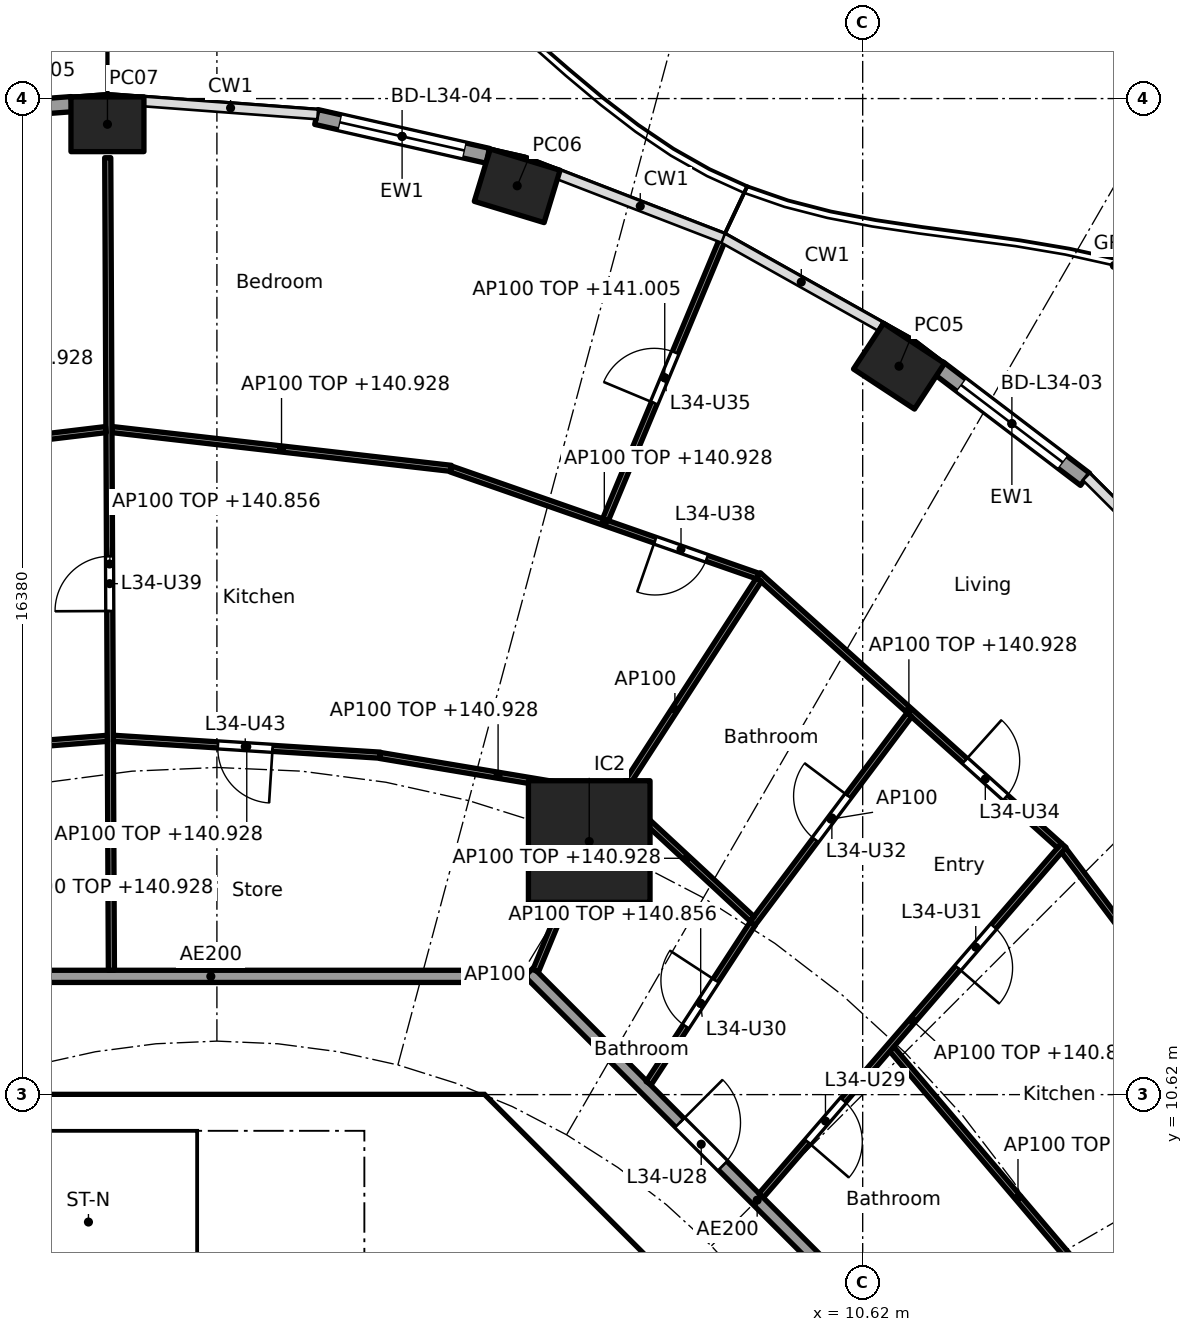
"""IFC4 building model, lengths in metres.
Left out: names, types, materials, properties, quantities, classifications, styles, units other than length and angle.
Written with IfcOpenShell. Run it as: python <this file> out.ifc"""

import sys

from ifc_helpers import new_model, si_unit, direction, frame, frame_2d, origin, origin_2d, place, context, subcontext, project, spatial, polyline, rectangle, hollow_rectangle, outline, extrude, element, fill, save


model = new_model("IFC4")
c1 = context("Model", 3, precision=1e-05, world=origin(), true_north=direction((0.0, 1.0)))
c2 = subcontext(c1, "Body", "Model", "MODEL_VIEW")
j1 = project(units=[si_unit("LENGTHUNIT", "METRE"), si_unit("PLANEANGLEUNIT", "RADIAN")], contexts=[c1])
p1 = place(None, origin())
s1 = spatial("IfcSite", under=j1, at=p1, CompositionType="ELEMENT")
p2 = place(p1, origin())
s2 = spatial("IfcBuilding", under=s1, at=p2, CompositionType="ELEMENT")
p3 = place(p2, frame((0.0, 0.0, 138.1)))
s3 = spatial("IfcBuildingStorey", under=s2, at=p3, CompositionType="ELEMENT", Elevation=138.1)
for number, where, z_axis, x_axis in (
    (1, (11.218, 22.599, 0.0), (0.0, 0.0, 1.0), (-0.836, 0.549, 0.0)),
    (2, (4.938, 25.565, 0.0), (0.0, 0.0, 1.0), (-0.957, 0.292, 0.0)),
    (3, (-1.8, 26.577, 0.0), (0.0, 0.0, 1.0), (-1.0, 0.0, 0.0)),
):
    element("IfcColumn", number, at=place(p3, frame(where, z_axis=z_axis, x_axis=x_axis)), inside=s3, PredefinedType="COLUMN", context=c2, shape_type="SweptSolid", body=[
        extrude(hollow_rectangle(XDim=1.2, YDim=0.9, WallThickness=0.04, at=origin_2d()), origin(), (0.0, 0.0, 1.0), 3.7),
    ])
p4 = place(p3, frame((6.123, 14.782, 0.0), z_axis=(0.0, 0.0, 1.0), x_axis=(1.0, 0.0, 0.0)))
e4 = element("IfcColumn", 4, at=p4, inside=s3, PredefinedType="COLUMN", context=c2, shape_type="SweptSolid", body=[
    extrude(rectangle(XDim=2.0, YDim=2.0, at=origin_2d()), origin(), (0.0, 0.0, 1.0), 3.7),
])
p5 = place(p3, frame((11.869, 22.569, 0.0), z_axis=(0.0, 0.0, 1.0), x_axis=(0.796022231079, -0.605267385233, 0.0)))
e5 = element("IfcWall", 5, at=p5, inside=s3, PredefinedType="SOLIDWALL", context=c2, shape_type="SweptSolid", body=[
    extrude(rectangle(XDim=3.026, YDim=0.25, at=frame_2d((1.513, 0.0))), origin(), (0.0, 0.0, 1.0), 3.44),
])
p6 = place(p5, frame((0.463, 0.0, 0.0)))
e6 = element("IfcOpeningElement", 6, at=p6, cuts=e5, PredefinedType="OPENING", context=c2, shape_type="SweptSolid", body=[
    extrude(rectangle(XDim=2.1, YDim=2.4, at=frame_2d((1.05, 1.2))), frame((0.0, 0.135, 0.0), z_axis=(0.0, -1.0, 0.0), x_axis=(1.0, 0.0, 0.0)), (0.0, 0.0, 1.0), 0.27),
])
p7 = place(p3, frame((1.636, 26.697, 0.0), z_axis=(0.0, 0.0, 1.0), x_axis=(0.975339035722, -0.220711951186, 0.0)))
e7 = element("IfcWall", 7, at=p7, inside=s3, PredefinedType="SOLIDWALL", context=c2, shape_type="SweptSolid", body=[
    extrude(rectangle(XDim=2.89, YDim=0.25, at=frame_2d((1.445, 0.0))), origin(), (0.0, 0.0, 1.0), 3.44),
])
p8 = place(p7, frame((0.395, 0.0, 0.0)))
e8 = element("IfcOpeningElement", 8, at=p8, cuts=e7, PredefinedType="OPENING", context=c2, shape_type="SweptSolid", body=[
    extrude(rectangle(XDim=2.1, YDim=2.4, at=frame_2d((1.05, 1.2))), frame((0.0, 0.135, 0.0), z_axis=(0.0, -1.0, 0.0), x_axis=(1.0, 0.0, 0.0)), (0.0, 0.0, 1.0), 0.27),
])
p9 = place(p3, frame((-5.254, 26.694, 0.0), z_axis=(0.0, 0.0, 1.0), x_axis=(0.997231697044, 0.074356858535, 0.0)))
e9 = element("IfcWall", 9, at=p9, inside=s3, PredefinedType="SOLIDWALL", context=c2, shape_type="SweptSolid", body=[
    extrude(rectangle(XDim=2.873, YDim=0.25, at=frame_2d((1.437, 0.0))), origin(), (0.0, 0.0, 1.0), 3.44),
])
p10 = place(p9, frame((0.386, 0.0, 0.0)))
e10 = element("IfcOpeningElement", 10, at=p10, cuts=e9, PredefinedType="OPENING", context=c2, shape_type="SweptSolid", body=[
    extrude(rectangle(XDim=2.1, YDim=2.4, at=frame_2d((1.05, 1.2))), frame((0.0, 0.135, 0.0), z_axis=(0.0, -1.0, 0.0), x_axis=(1.0, 0.0, 0.0)), (0.0, 0.0, 1.0), 0.27),
])
p11 = place(p3, frame((9.988, 4.613, 0.0), z_axis=(0.0, 0.0, 1.0), x_axis=(-0.707106781187, 0.707106781187, 0.0)))
e11 = element("IfcWall", 11, at=p11, inside=s3, PredefinedType="SHEAR", context=c2, shape_type="SweptSolid", body=[
    extrude(rectangle(XDim=7.602, YDim=0.6, at=frame_2d((3.801, 0.0))), origin(), (0.0, 0.0, 1.0), 3.44),
])
p12 = place(p11, frame((3.201, 0.0, 0.0)))
e12 = element("IfcOpeningElement", 12, at=p12, cuts=e11, PredefinedType="OPENING", context=c2, shape_type="SweptSolid", body=[
    extrude(rectangle(XDim=1.2, YDim=2.1, at=frame_2d((0.6, 1.05))), frame((0.0, 0.31, 0.0), z_axis=(0.0, -1.0, 0.0), x_axis=(1.0, 0.0, 0.0)), (0.0, 0.0, 1.0), 0.62),
])
p13 = place(p3, frame((4.0, 7.025, 0.0), z_axis=(0.0, 0.0, 1.0), x_axis=(0.0, 1.0, 0.0)))
e13 = element("IfcWall", 13, at=p13, inside=s3, PredefinedType="SOLIDWALL", context=c2, shape_type="SweptSolid", body=[
    extrude(rectangle(XDim=3.0, YDim=0.2, at=frame_2d((1.5, 0.0))), origin(), (0.0, 0.0, 1.0), 3.44),
])
p14 = place(p13, frame((0.925, 0.0, 0.0)))
e14 = element("IfcOpeningElement", 14, at=p14, cuts=e13, PredefinedType="OPENING", context=c2, shape_type="SweptSolid", body=[
    extrude(rectangle(XDim=1.1, YDim=2.1, at=frame_2d((0.55, 1.05))), frame((0.0, 0.11, 0.0), z_axis=(0.0, -1.0, 0.0), x_axis=(1.0, 0.0, 0.0)), (0.0, 0.0, 1.0), 0.22),
])
p15 = place(p3, origin())
e15 = element("IfcWall", 15, at=p15, inside=s3, PredefinedType="SHEAR", context=c2, shape_type="SweptSolid", body=[
    extrude(outline(polyline([(-4.152, 10.025), (-4.401, 9.776), (-4.825, 10.2), (-4.401, 10.625), (4.401, 10.625), (4.825, 10.2), (4.401, 9.776), (4.152, 10.025), (-4.152, 10.025)])), origin(), (0.0, 0.0, 1.0), 3.44),
])
p16 = place(p3, frame((12.635, 5.134, 0.0), z_axis=(0.0, 0.0, 1.0), x_axis=(-0.707106781187, 0.707106781187, 0.0)))
e16 = element("IfcWall", 16, at=p16, inside=s3, PredefinedType="PARTITIONING", context=c2, shape_type="SweptSolid", body=[
    extrude(rectangle(XDim=10.609, YDim=0.2, at=frame_2d((5.305, 0.0))), origin(), (0.0, 0.0, 1.0), 3.44),
])
p17 = place(p16, frame((6.106, 0.0, 0.0)))
e17 = element("IfcOpeningElement", 17, at=p17, cuts=e16, PredefinedType="OPENING", context=c2, shape_type="SweptSolid", body=[
    extrude(rectangle(XDim=1.0, YDim=2.1, at=frame_2d((0.5, 1.05))), frame((0.0, 0.11, 0.0), z_axis=(0.0, -1.0, 0.0), x_axis=(1.0, 0.0, 0.0)), (0.0, 0.0, 1.0), 0.22),
])
p18 = place(p3, frame((5.104, 12.565, 0.0), z_axis=(0.0, 0.0, 1.0), x_axis=(-1.0, 0.0, 0.0)))
e18 = element("IfcWall", 18, at=p18, inside=s3, PredefinedType="PARTITIONING", context=c2, shape_type="SweptSolid", body=[
    extrude(rectangle(XDim=10.409, YDim=0.2, at=frame_2d((5.205, 0.0))), origin(), (0.0, 0.0, 1.0), 3.44),
])
p19 = place(p3, frame((15.25, 6.483, 0.0), z_axis=(0.0, 0.0, 1.0), x_axis=(-0.647379829894, 0.762167537912, 0.0)))
e19 = element("IfcWall", 19, at=p19, inside=s3, PredefinedType="PARTITIONING", context=c2, shape_type="SweptSolid", body=[
    extrude(rectangle(XDim=6.413, YDim=0.1, at=frame_2d((3.206, 0.0))), origin(), (0.0, 0.0, 1.0), 2.828),
])
p20 = place(p3, frame((18.106, 9.098, 0.0), z_axis=(0.0, 0.0, 1.0), x_axis=(-0.602393803621, 0.798199038686, 0.0)))
e20 = element("IfcWall", 20, at=p20, inside=s3, PredefinedType="PARTITIONING", context=c2, shape_type="SweptSolid", body=[
    extrude(rectangle(XDim=6.944, YDim=0.1, at=frame_2d((3.472, 0.0))), origin(), (0.0, 0.0, 1.0), 2.828),
])
p21 = place(p3, frame((8.95, 8.96, 0.0), z_axis=(0.0, 0.0, 1.0), x_axis=(0.653829477183, 0.756641932995, 0.0)))
e21 = element("IfcWall", 21, at=p21, inside=s3, PredefinedType="PARTITIONING", context=c2, shape_type="SweptSolid", body=[
    extrude(rectangle(XDim=7.611, YDim=0.1, at=frame_2d((3.805, 0.0))), origin(), (0.0, 0.0, 1.0), 2.756),
])
p22 = place(p21, frame((1.168, 0.0, 0.0)))
e22 = element("IfcOpeningElement", 22, at=p22, cuts=e21, PredefinedType="OPENING", context=c2, shape_type="SweptSolid", body=[
    extrude(rectangle(XDim=0.9, YDim=2.1, at=frame_2d((0.45, 1.05))), frame((0.0, 0.06, 0.0), z_axis=(0.0, -1.0, 0.0), x_axis=(1.0, 0.0, 0.0)), (0.0, 0.0, 1.0), 0.12),
])
p23 = place(p21, frame((4.948, 0.0, 0.0)))
e23 = element("IfcOpeningElement", 23, at=p23, cuts=e21, PredefinedType="OPENING", context=c2, shape_type="SweptSolid", body=[
    extrude(rectangle(XDim=0.9, YDim=2.1, at=frame_2d((0.45, 1.05))), frame((0.0, 0.06, 0.0), z_axis=(0.0, -1.0, 0.0), x_axis=(1.0, 0.0, 0.0)), (0.0, 0.0, 1.0), 0.12),
])
p24 = place(p3, frame((13.856, 14.714, 0.0), z_axis=(0.0, 0.0, 1.0), x_axis=(-0.743793479211, 0.668409500444, 0.0)))
e24 = element("IfcWall", 24, at=p24, inside=s3, PredefinedType="PARTITIONING", context=c2, shape_type="SweptSolid", body=[
    extrude(rectangle(XDim=6.659, YDim=0.1, at=frame_2d((3.329, 0.0))), origin(), (0.0, 0.0, 1.0), 2.828),
])
p25 = place(p24, frame((1.19, 0.0, 0.0)))
e25 = element("IfcOpeningElement", 25, at=p25, cuts=e24, PredefinedType="OPENING", context=c2, shape_type="SweptSolid", body=[
    extrude(rectangle(XDim=0.9, YDim=2.1, at=frame_2d((0.45, 1.05))), frame((0.0, 0.06, 0.0), z_axis=(0.0, -1.0, 0.0), x_axis=(1.0, 0.0, 0.0)), (0.0, 0.0, 1.0), 0.12),
])
p26 = place(p3, frame((7.099, 10.808, 0.0), z_axis=(0.0, 0.0, 1.0), x_axis=(0.546709757921, 0.837322184463, 0.0)))
e26 = element("IfcWall", 26, at=p26, inside=s3, PredefinedType="PARTITIONING", context=c2, shape_type="SweptSolid", body=[
    extrude(rectangle(XDim=3.134, YDim=0.1, at=frame_2d((1.567, 0.0))), origin(), (0.0, 0.0, 1.0), 2.756),
])
p27 = place(p26, frame((1.117, 0.0, 0.0)))
e27 = element("IfcOpeningElement", 27, at=p27, cuts=e26, PredefinedType="OPENING", context=c2, shape_type="SweptSolid", body=[
    extrude(rectangle(XDim=0.9, YDim=2.1, at=frame_2d((0.45, 1.05))), frame((0.0, 0.06, 0.0), z_axis=(0.0, -1.0, 0.0), x_axis=(1.0, 0.0, 0.0)), (0.0, 0.0, 1.0), 0.12),
])
p28 = place(p3, frame((8.81, 13.434, 0.0), z_axis=(0.0, 0.0, 1.0), x_axis=(0.600491337497, 0.799631261014, 0.0)))
e28 = element("IfcWall", 28, at=p28, inside=s3, PredefinedType="PARTITIONING", context=c2, shape_type="SweptSolid", body=[
    extrude(rectangle(XDim=4.292, YDim=0.1, at=frame_2d((2.146, 0.0))), origin(), (0.0, 0.0, 1.0), 3.44),
])
p29 = place(p28, frame((1.721, 0.0, 0.0)))
e29 = element("IfcOpeningElement", 29, at=p29, cuts=e28, PredefinedType="OPENING", context=c2, shape_type="SweptSolid", body=[
    extrude(rectangle(XDim=0.9, YDim=2.1, at=frame_2d((0.45, 1.05))), frame((0.0, 0.06, 0.0), z_axis=(0.0, -1.0, 0.0), x_axis=(1.0, 0.0, 0.0)), (0.0, 0.0, 1.0), 0.12),
])
p30 = place(p3, frame((8.803, 13.508, 0.0), z_axis=(0.0, 0.0, 1.0), x_axis=(-0.733130973758, 0.680087476224, 0.0)))
e30 = element("IfcWall", 30, at=p30, inside=s3, PredefinedType="PARTITIONING", context=c2, shape_type="SweptSolid", body=[
    extrude(rectangle(XDim=2.937, YDim=0.1, at=frame_2d((1.468, 0.0))), origin(), (0.0, 0.0, 1.0), 2.828),
])
p31 = place(p3, frame((5.243, 12.657, 0.0), z_axis=(0.0, 0.0, 1.0), x_axis=(0.382703272338, 0.923871314276, 0.0)))
e31 = element("IfcWall", 31, at=p31, inside=s3, PredefinedType="PARTITIONING", context=c2, shape_type="SweptSolid", body=[
    extrude(rectangle(XDim=2.249, YDim=0.1, at=frame_2d((1.125, 0.0))), origin(), (0.0, 0.0, 1.0), 3.44),
])
p32 = place(p3, frame((6.15, 14.824, 0.0), z_axis=(0.0, 0.0, 1.0), x_axis=(0.543711280797, 0.839272329542, 0.0)))
e32 = element("IfcWall", 32, at=p32, inside=s3, PredefinedType="PARTITIONING", context=c2, shape_type="SweptSolid", body=[
    extrude(rectangle(XDim=5.083, YDim=0.1, at=frame_2d((2.541, 0.0))), origin(), (0.0, 0.0, 1.0), 3.44),
])
p33 = place(p3, frame((6.564, 15.547, 0.0), z_axis=(0.0, 0.0, 1.0), x_axis=(-0.986269521186, 0.165143669511, 0.0)))
e33 = element("IfcWall", 33, at=p33, inside=s3, PredefinedType="PARTITIONING", context=c2, shape_type="SweptSolid", body=[
    extrude(rectangle(XDim=3.934, YDim=0.1, at=frame_2d((1.967, 0.0))), origin(), (0.0, 0.0, 1.0), 2.828),
])
p34 = place(p3, frame((8.894, 19.148, 0.0), z_axis=(0.0, 0.0, 1.0), x_axis=(-0.944182005381, 0.329424256414, 0.0)))
e34 = element("IfcWall", 34, at=p34, inside=s3, PredefinedType="PARTITIONING", context=c2, shape_type="SweptSolid", body=[
    extrude(rectangle(XDim=5.344, YDim=0.1, at=frame_2d((2.672, 0.0))), origin(), (0.0, 0.0, 1.0), 2.828),
])
p35 = place(p34, frame((0.886, 0.0, 0.0)))
e35 = element("IfcOpeningElement", 35, at=p35, cuts=e34, PredefinedType="OPENING", context=c2, shape_type="SweptSolid", body=[
    extrude(rectangle(XDim=0.9, YDim=2.1, at=frame_2d((0.45, 1.05))), frame((0.0, 0.06, 0.0), z_axis=(0.0, -1.0, 0.0), x_axis=(1.0, 0.0, 0.0)), (0.0, 0.0, 1.0), 0.12),
])
p36 = place(p3, frame((6.39, 20.074, 0.0), z_axis=(0.0, 0.0, 1.0), x_axis=(0.385304133029, 0.922789642915, 0.0)))
e36 = element("IfcWall", 36, at=p36, inside=s3, PredefinedType="PARTITIONING", context=c2, shape_type="SweptSolid", body=[
    extrude(rectangle(XDim=5.058, YDim=0.1, at=frame_2d((2.529, 0.0))), origin(), (0.0, 0.0, 1.0), 2.905),
])
p37 = place(p36, frame((2.079, 0.0, 0.0)))
e37 = element("IfcOpeningElement", 37, at=p37, cuts=e36, PredefinedType="OPENING", context=c2, shape_type="SweptSolid", body=[
    extrude(rectangle(XDim=0.9, YDim=2.1, at=frame_2d((0.45, 1.05))), frame((0.0, 0.06, 0.0), z_axis=(0.0, -1.0, 0.0), x_axis=(1.0, 0.0, 0.0)), (0.0, 0.0, 1.0), 0.12),
])
p38 = place(p3, frame((2.685, 16.202, 0.0), z_axis=(0.0, 0.0, 1.0), x_axis=(-0.998000808042, 0.063201164138, 0.0)))
e38 = element("IfcWall", 38, at=p38, inside=s3, PredefinedType="PARTITIONING", context=c2, shape_type="SweptSolid", body=[
    extrude(rectangle(XDim=4.396, YDim=0.1, at=frame_2d((2.198, 0.0))), origin(), (0.0, 0.0, 1.0), 2.828),
])
p39 = place(p38, frame((1.773, 0.0, 0.0)))
e39 = element("IfcOpeningElement", 39, at=p39, cuts=e38, PredefinedType="OPENING", context=c2, shape_type="SweptSolid", body=[
    extrude(rectangle(XDim=0.9, YDim=2.1, at=frame_2d((0.45, 1.05))), frame((0.0, 0.06, 0.0), z_axis=(0.0, -1.0, 0.0), x_axis=(1.0, 0.0, 0.0)), (0.0, 0.0, 1.0), 0.12),
])
p40 = place(p3, frame((3.851, 20.919, 0.0), z_axis=(0.0, 0.0, 1.0), x_axis=(-0.993519908136, 0.11365822512, 0.0)))
e40 = element("IfcWall", 40, at=p40, inside=s3, PredefinedType="PARTITIONING", context=c2, shape_type="SweptSolid", body=[
    extrude(rectangle(XDim=5.613, YDim=0.1, at=frame_2d((2.806, 0.0))), origin(), (0.0, 0.0, 1.0), 2.828),
])
p41 = place(p3, frame((-1.735, 12.665, 0.0), z_axis=(0.0, 0.0, 1.0), x_axis=(-0.004494500855, 0.99998989968, 0.0)))
e41 = element("IfcWall", 41, at=p41, inside=s3, PredefinedType="PARTITIONING", context=c2, shape_type="SweptSolid", body=[
    extrude(rectangle(XDim=13.363, YDim=0.1, at=frame_2d((6.681, 0.0))), origin(), (0.0, 0.0, 1.0), 2.756),
])
p42 = place(p41, frame((5.908, 0.0, 0.0)))
e42 = element("IfcOpeningElement", 42, at=p42, cuts=e41, PredefinedType="OPENING", context=c2, shape_type="SweptSolid", body=[
    extrude(rectangle(XDim=0.9, YDim=2.1, at=frame_2d((0.45, 1.05))), frame((0.0, 0.06, 0.0), z_axis=(0.0, -1.0, 0.0), x_axis=(1.0, 0.0, 0.0)), (0.0, 0.0, 1.0), 0.12),
])
p43 = place(p3, frame((-1.802, 16.479, 0.0), z_axis=(0.0, 0.0, 1.0), x_axis=(-0.996907698294, -0.078581429625, 0.0)))
e43 = element("IfcWall", 43, at=p43, inside=s3, PredefinedType="PARTITIONING", context=c2, shape_type="SweptSolid", body=[
    extrude(rectangle(XDim=4.536, YDim=0.1, at=frame_2d((2.268, 0.0))), origin(), (0.0, 0.0, 1.0), 2.828),
])
p44 = place(p43, frame((1.818, 0.0, 0.0)))
e44 = element("IfcOpeningElement", 44, at=p44, cuts=e43, PredefinedType="OPENING", context=c2, shape_type="SweptSolid", body=[
    extrude(rectangle(XDim=0.9, YDim=2.1, at=frame_2d((0.45, 1.05))), frame((0.0, 0.06, 0.0), z_axis=(0.0, -1.0, 0.0), x_axis=(1.0, 0.0, 0.0)), (0.0, 0.0, 1.0), 0.12),
])
p45 = place(p3, frame((-1.825, 21.557, 0.0), z_axis=(0.0, 0.0, 1.0), x_axis=(-0.992915053711, -0.11882632753, 0.0)))
e45 = element("IfcWall", 45, at=p45, inside=s3, PredefinedType="PARTITIONING", context=c2, shape_type="SweptSolid", body=[
    extrude(rectangle(XDim=5.615, YDim=0.1, at=frame_2d((2.808, 0.0))), origin(), (0.0, 0.0, 1.0), 2.828),
])
p46 = place(p45, frame((2.358, 0.0, 0.0)))
e46 = element("IfcOpeningElement", 46, at=p46, cuts=e45, PredefinedType="OPENING", context=c2, shape_type="SweptSolid", body=[
    extrude(rectangle(XDim=0.9, YDim=2.1, at=frame_2d((0.45, 1.05))), frame((0.0, 0.06, 0.0), z_axis=(0.0, -1.0, 0.0), x_axis=(1.0, 0.0, 0.0)), (0.0, 0.0, 1.0), 0.12),
])
p47 = place(p6, origin())
e47 = element("IfcDoor", 47, at=p47, inside=s3, OperationType="SLIDING_TO_LEFT", PredefinedType="DOOR", context=c2, shape_type="SweptSolid", body=[
    extrude(rectangle(XDim=2.1, YDim=2.4, at=frame_2d((1.05, 1.2))), frame((0.0, 0.025, 0.0), z_axis=(0.0, -1.0, 0.0), x_axis=(1.0, 0.0, 0.0)), (0.0, 0.0, 1.0), 0.05),
])
fill(e6, e47)
p48 = place(p8, origin())
e48 = element("IfcDoor", 48, at=p48, inside=s3, OperationType="SLIDING_TO_LEFT", PredefinedType="DOOR", context=c2, shape_type="SweptSolid", body=[
    extrude(rectangle(XDim=2.1, YDim=2.4, at=frame_2d((1.05, 1.2))), frame((0.0, 0.025, 0.0), z_axis=(0.0, -1.0, 0.0), x_axis=(1.0, 0.0, 0.0)), (0.0, 0.0, 1.0), 0.05),
])
fill(e8, e48)
p49 = place(p14, origin())
e49 = element("IfcDoor", 49, at=p49, inside=s3, OperationType="SINGLE_SWING_RIGHT", PredefinedType="DOOR", context=c2, shape_type="SweptSolid", body=[
    extrude(rectangle(XDim=1.1, YDim=2.1, at=frame_2d((0.55, 1.05))), frame((0.0, 0.025, 0.0), z_axis=(0.0, -1.0, 0.0), x_axis=(1.0, 0.0, 0.0)), (0.0, 0.0, 1.0), 0.05),
])
fill(e14, e49)
p50 = place(p17, frame((1.0, 0.0, 0.0), x_axis=(-1.0, 0.0, 0.0)))
e50 = element("IfcDoor", 50, at=p50, inside=s3, OperationType="SINGLE_SWING_LEFT", PredefinedType="DOOR", context=c2, shape_type="SweptSolid", body=[
    extrude(rectangle(XDim=1.0, YDim=2.1, at=frame_2d((0.5, 1.05))), frame((0.0, 0.025, 0.0), z_axis=(0.0, -1.0, 0.0), x_axis=(1.0, 0.0, 0.0)), (0.0, 0.0, 1.0), 0.05),
])
fill(e17, e50)
p51 = place(p22, frame((0.9, 0.0, 0.0), x_axis=(-1.0, 0.0, 0.0)))
e51 = element("IfcDoor", 51, at=p51, inside=s3, OperationType="SINGLE_SWING_RIGHT", PredefinedType="DOOR", context=c2, shape_type="SweptSolid", body=[
    extrude(rectangle(XDim=0.9, YDim=2.1, at=frame_2d((0.45, 1.05))), frame((0.0, 0.025, 0.0), z_axis=(0.0, -1.0, 0.0), x_axis=(1.0, 0.0, 0.0)), (0.0, 0.0, 1.0), 0.05),
])
fill(e22, e51)
p52 = place(p27, origin())
e52 = element("IfcDoor", 52, at=p52, inside=s3, OperationType="SINGLE_SWING_RIGHT", PredefinedType="DOOR", context=c2, shape_type="SweptSolid", body=[
    extrude(rectangle(XDim=0.9, YDim=2.1, at=frame_2d((0.45, 1.05))), frame((0.0, 0.025, 0.0), z_axis=(0.0, -1.0, 0.0), x_axis=(1.0, 0.0, 0.0)), (0.0, 0.0, 1.0), 0.05),
])
fill(e27, e52)
p53 = place(p23, frame((0.9, 0.0, 0.0), x_axis=(-1.0, 0.0, 0.0)))
e53 = element("IfcDoor", 53, at=p53, inside=s3, OperationType="SINGLE_SWING_RIGHT", PredefinedType="DOOR", context=c2, shape_type="SweptSolid", body=[
    extrude(rectangle(XDim=0.9, YDim=2.1, at=frame_2d((0.45, 1.05))), frame((0.0, 0.025, 0.0), z_axis=(0.0, -1.0, 0.0), x_axis=(1.0, 0.0, 0.0)), (0.0, 0.0, 1.0), 0.05),
])
fill(e23, e53)
p54 = place(p29, origin())
e54 = element("IfcDoor", 54, at=p54, inside=s3, OperationType="SINGLE_SWING_RIGHT", PredefinedType="DOOR", context=c2, shape_type="SweptSolid", body=[
    extrude(rectangle(XDim=0.9, YDim=2.1, at=frame_2d((0.45, 1.05))), frame((0.0, 0.025, 0.0), z_axis=(0.0, -1.0, 0.0), x_axis=(1.0, 0.0, 0.0)), (0.0, 0.0, 1.0), 0.05),
])
fill(e29, e54)
p55 = place(p25, frame((0.9, 0.0, 0.0), x_axis=(-1.0, 0.0, 0.0)))
e55 = element("IfcDoor", 55, at=p55, inside=s3, OperationType="SINGLE_SWING_LEFT", PredefinedType="DOOR", context=c2, shape_type="SweptSolid", body=[
    extrude(rectangle(XDim=0.9, YDim=2.1, at=frame_2d((0.45, 1.05))), frame((0.0, 0.025, 0.0), z_axis=(0.0, -1.0, 0.0), x_axis=(1.0, 0.0, 0.0)), (0.0, 0.0, 1.0), 0.05),
])
fill(e25, e55)
p56 = place(p37, origin())
e56 = element("IfcDoor", 56, at=p56, inside=s3, OperationType="SINGLE_SWING_LEFT", PredefinedType="DOOR", context=c2, shape_type="SweptSolid", body=[
    extrude(rectangle(XDim=0.9, YDim=2.1, at=frame_2d((0.45, 1.05))), frame((0.0, 0.025, 0.0), z_axis=(0.0, -1.0, 0.0), x_axis=(1.0, 0.0, 0.0)), (0.0, 0.0, 1.0), 0.05),
])
fill(e37, e56)
p57 = place(p35, origin())
e57 = element("IfcDoor", 57, at=p57, inside=s3, OperationType="SINGLE_SWING_RIGHT", PredefinedType="DOOR", context=c2, shape_type="SweptSolid", body=[
    extrude(rectangle(XDim=0.9, YDim=2.1, at=frame_2d((0.45, 1.05))), frame((0.0, 0.025, 0.0), z_axis=(0.0, -1.0, 0.0), x_axis=(1.0, 0.0, 0.0)), (0.0, 0.0, 1.0), 0.05),
])
fill(e35, e57)
p58 = place(p42, origin())
e58 = element("IfcDoor", 58, at=p58, inside=s3, OperationType="SINGLE_SWING_LEFT", PredefinedType="DOOR", context=c2, shape_type="SweptSolid", body=[
    extrude(rectangle(XDim=0.9, YDim=2.1, at=frame_2d((0.45, 1.05))), frame((0.0, 0.025, 0.0), z_axis=(0.0, -1.0, 0.0), x_axis=(1.0, 0.0, 0.0)), (0.0, 0.0, 1.0), 0.05),
])
fill(e42, e58)
p59 = place(p39, origin())
e59 = element("IfcDoor", 59, at=p59, inside=s3, OperationType="SINGLE_SWING_LEFT", PredefinedType="DOOR", context=c2, shape_type="SweptSolid", body=[
    extrude(rectangle(XDim=0.9, YDim=2.1, at=frame_2d((0.45, 1.05))), frame((0.0, 0.025, 0.0), z_axis=(0.0, -1.0, 0.0), x_axis=(1.0, 0.0, 0.0)), (0.0, 0.0, 1.0), 0.05),
])
fill(e39, e59)
save(model, sys.argv[1])
